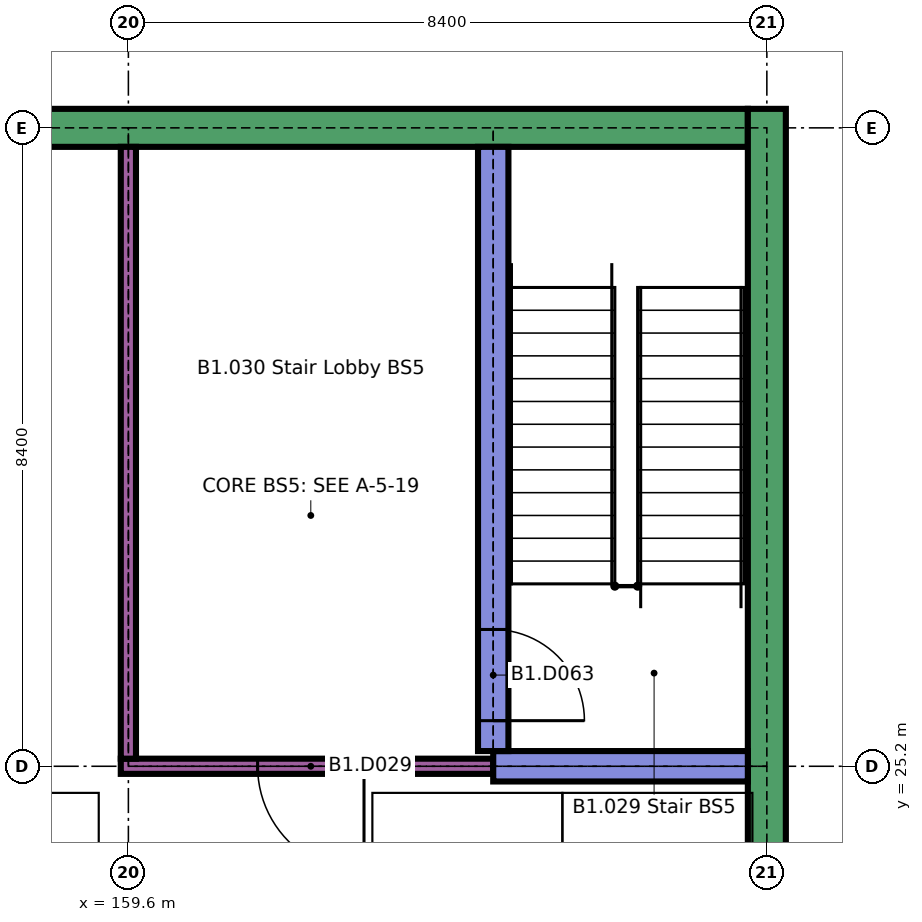
"""IFC4 building model, lengths in metres.
Left out: names, types, materials, properties, quantities, classifications, styles, units other than length and angle.
Written with IfcOpenShell. Run it as: python <this file> out.ifc"""

import sys

from ifc_helpers import new_model, si_unit, direction, frame, frame_2d, origin, place, context, subcontext, project, spatial, rectangle, extrude, element, fill, save


model = new_model("IFC4")
c1 = context("Model", 3, precision=1e-05, world=origin(), true_north=direction((0.0, 1.0)))
c2 = subcontext(c1, "Body", "Model", "MODEL_VIEW")
j1 = project(units=[si_unit("LENGTHUNIT", "METRE"), si_unit("PLANEANGLEUNIT", "RADIAN")], contexts=[c1])
p1 = place(None, origin())
s1 = spatial("IfcSite", under=j1, at=p1, CompositionType="ELEMENT")
p2 = place(p1, origin())
s2 = spatial("IfcBuilding", under=s1, at=p2, CompositionType="ELEMENT")
p3 = place(p2, frame((0.0, 0.0, -4.2)))
s3 = spatial("IfcBuildingStorey", under=s2, at=p3, CompositionType="ELEMENT", Elevation=-4.2)
p4 = place(p3, frame((151.65, 33.6, 0.0), z_axis=(0.0, 0.0, 1.0), x_axis=(1.0, 0.0, 0.0)))
e1 = element("IfcWall", 1, at=p4, inside=s3, PredefinedType="SOLIDWALL", context=c2, shape_type="SweptSolid", body=[
    extrude(rectangle(XDim=16.1, YDim=0.5, at=frame_2d((8.05, 0.0))), origin(), (0.0, 0.0, 1.0), 3.75),
])
p5 = place(p3, frame((168.0, 17.25, 0.0), z_axis=(0.0, 0.0, 1.0), x_axis=(0.0, 1.0, 0.0)))
e2 = element("IfcWall", 2, at=p5, inside=s3, PredefinedType="SOLIDWALL", context=c2, shape_type="SweptSolid", body=[
    extrude(rectangle(XDim=16.6, YDim=0.5, at=frame_2d((8.3, 0.0))), origin(), (0.0, 0.0, 1.0), 3.75),
])
p6 = place(p3, frame((159.5, 25.2, 0.0), z_axis=(0.0, 0.0, 1.0), x_axis=(1.0, 0.0, 0.0)))
e3 = element("IfcWall", 3, at=p6, inside=s3, PredefinedType="PARTITIONING", context=c2, shape_type="SweptSolid", body=[
    extrude(rectangle(XDim=4.9, YDim=0.2, at=frame_2d((2.45, 0.0))), origin(), (0.0, 0.0, 1.0), 3.75),
])
p7 = place(p6, frame((1.8, 0.0, 0.0)))
e4 = element("IfcOpeningElement", 4, at=p7, cuts=e3, PredefinedType="OPENING", context=c2, shape_type="SweptSolid", body=[
    extrude(rectangle(XDim=1.4, YDim=2.1, at=frame_2d((0.7, 1.05))), frame((0.0, 0.11, 0.0), z_axis=(0.0, -1.0, 0.0), x_axis=(1.0, 0.0, 0.0)), (0.0, 0.0, 1.0), 0.22),
])
p8 = place(p3, frame((164.4, 25.2, 0.0), z_axis=(0.0, 0.0, 1.0), x_axis=(1.0, 0.0, 0.0)))
e5 = element("IfcWall", 5, at=p8, inside=s3, PredefinedType="SHEAR", context=c2, shape_type="SweptSolid", body=[
    extrude(rectangle(XDim=3.35, YDim=0.4, at=frame_2d((1.675, 0.0))), origin(), (0.0, 0.0, 1.0), 3.75),
])
p9 = place(p3, frame((159.6, 25.3, 0.0), z_axis=(0.0, 0.0, 1.0), x_axis=(0.0, 1.0, 0.0)))
e6 = element("IfcWall", 6, at=p9, inside=s3, PredefinedType="PARTITIONING", context=c2, shape_type="SweptSolid", body=[
    extrude(rectangle(XDim=8.05, YDim=0.2, at=frame_2d((4.025, 0.0))), origin(), (0.0, 0.0, 1.0), 3.75),
])
p10 = place(p3, frame((164.4, 25.4, 0.0), z_axis=(0.0, 0.0, 1.0), x_axis=(0.0, 1.0, 0.0)))
e7 = element("IfcWall", 7, at=p10, inside=s3, PredefinedType="SHEAR", context=c2, shape_type="SweptSolid", body=[
    extrude(rectangle(XDim=7.95, YDim=0.4, at=frame_2d((3.975, 0.0))), origin(), (0.0, 0.0, 1.0), 3.75),
])
p11 = place(p10, frame((0.4, 0.0, 0.0)))
e8 = element("IfcOpeningElement", 8, at=p11, cuts=e7, PredefinedType="OPENING", context=c2, shape_type="SweptSolid", body=[
    extrude(rectangle(XDim=1.2, YDim=2.1, at=frame_2d((0.6, 1.05))), frame((0.0, 0.21, 0.0), z_axis=(0.0, -1.0, 0.0), x_axis=(1.0, 0.0, 0.0)), (0.0, 0.0, 1.0), 0.42),
])
p12 = place(p7, origin())
e9 = element("IfcDoor", 9, at=p12, inside=s3, OperationType="SINGLE_SWING_RIGHT", PredefinedType="DOOR", context=c2, shape_type="SweptSolid", body=[
    extrude(rectangle(XDim=1.4, YDim=2.1, at=frame_2d((0.7, 1.05))), frame((0.0, 0.025, 0.0), z_axis=(0.0, -1.0, 0.0), x_axis=(1.0, 0.0, 0.0)), (0.0, 0.0, 1.0), 0.05),
])
fill(e4, e9)
p13 = place(p11, origin())
e10 = element("IfcDoor", 10, at=p13, inside=s3, OperationType="SINGLE_SWING_LEFT", PredefinedType="DOOR", context=c2, shape_type="SweptSolid", body=[
    extrude(rectangle(XDim=1.2, YDim=2.1, at=frame_2d((0.6, 1.05))), frame((0.0, 0.025, 0.0), z_axis=(0.0, -1.0, 0.0), x_axis=(1.0, 0.0, 0.0)), (0.0, 0.0, 1.0), 0.05),
])
fill(e8, e10)
save(model, sys.argv[1])
